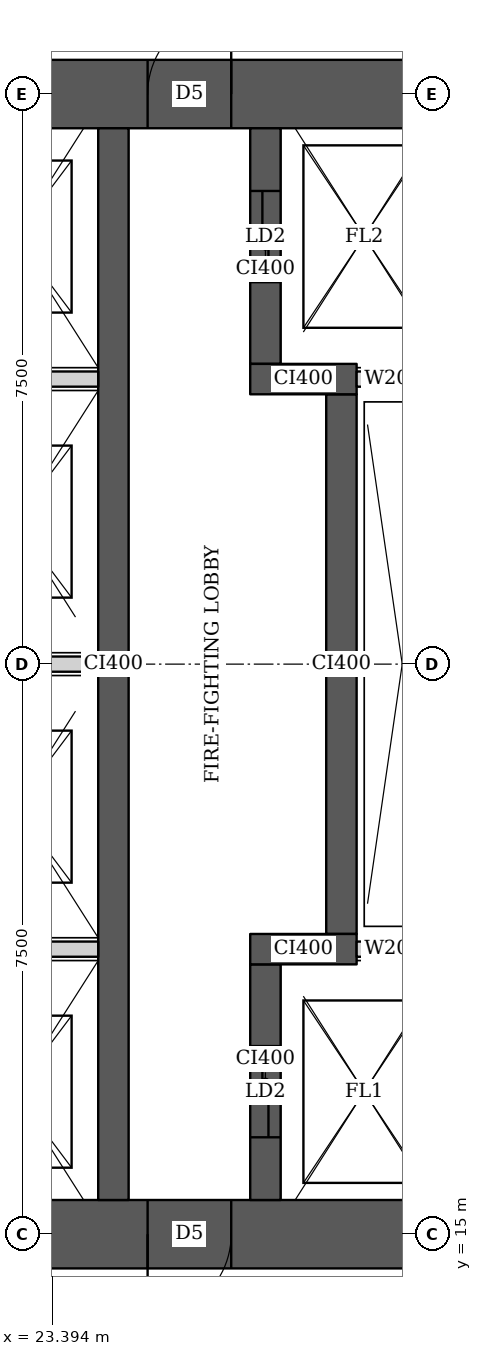
"""IFC4 building model, lengths in metres.
Left out: names, types, materials, properties, quantities, classifications, styles, units other than length and angle.
Written with IfcOpenShell. Run it as: python <this file> out.ifc"""

import sys

from ifc_helpers import new_model, si_unit, direction, frame, frame_2d, origin, place, context, subcontext, project, spatial, rectangle, extrude, element, fill, save


model = new_model("IFC4")
c1 = context("Model", 3, precision=1e-05, world=origin(), true_north=direction((0.0, 1.0)))
c2 = subcontext(c1, "Body", "Model", "MODEL_VIEW")
j1 = project(units=[si_unit("LENGTHUNIT", "METRE"), si_unit("PLANEANGLEUNIT", "RADIAN")], contexts=[c1])
p1 = place(None, origin())
s1 = spatial("IfcSite", under=j1, at=p1, CompositionType="ELEMENT")
p2 = place(p1, origin())
s2 = spatial("IfcBuilding", under=s1, at=p2, CompositionType="ELEMENT")
p3 = place(p2, frame((0.0, 0.0, 266.6)))
s3 = spatial("IfcBuildingStorey", under=s2, at=p3, CompositionType="ELEMENT", Elevation=266.6)
p4 = place(p3, frame((13.95, 15.0, 0.0), z_axis=(0.0, 0.0, 1.0), x_axis=(1.0, 0.0, 0.0)))
e1 = element("IfcWall", 1, at=p4, inside=s3, PredefinedType="SHEAR", context=c2, shape_type="SweptSolid", body=[
    extrude(rectangle(XDim=15.3, YDim=0.9, at=frame_2d((7.65, 0.0))), origin(), (0.0, 0.0, 1.0), 3.75),
])
p5 = place(p4, frame((4.45, 0.0, 0.0)))
e2 = element("IfcOpeningElement", 2, at=p5, cuts=e1, PredefinedType="OPENING", context=c2, shape_type="SweptSolid", body=[
    extrude(rectangle(XDim=1.8, YDim=2.1, at=frame_2d((0.9, 1.05))), frame((0.0, 0.46, 0.0), z_axis=(0.0, -1.0, 0.0), x_axis=(1.0, 0.0, 0.0)), (0.0, 0.0, 1.0), 0.92),
])
p6 = place(p4, frame((10.7, 0.0, 0.0)))
e3 = element("IfcOpeningElement", 3, at=p6, cuts=e1, PredefinedType="OPENING", context=c2, shape_type="SweptSolid", body=[
    extrude(rectangle(XDim=1.1, YDim=2.1, at=frame_2d((0.55, 1.05))), frame((0.0, 0.46, 0.0), z_axis=(0.0, -1.0, 0.0), x_axis=(1.0, 0.0, 0.0)), (0.0, 0.0, 1.0), 0.92),
])
p7 = place(p3, frame((13.95, 30.0, 0.0), z_axis=(0.0, 0.0, 1.0), x_axis=(1.0, 0.0, 0.0)))
e4 = element("IfcWall", 4, at=p7, inside=s3, PredefinedType="SHEAR", context=c2, shape_type="SweptSolid", body=[
    extrude(rectangle(XDim=15.3, YDim=0.9, at=frame_2d((7.65, 0.0))), origin(), (0.0, 0.0, 1.0), 3.75),
])
p8 = place(p7, frame((4.45, 0.0, 0.0)))
e5 = element("IfcOpeningElement", 5, at=p8, cuts=e4, PredefinedType="OPENING", context=c2, shape_type="SweptSolid", body=[
    extrude(rectangle(XDim=1.8, YDim=2.1, at=frame_2d((0.9, 1.05))), frame((0.0, 0.46, 0.0), z_axis=(0.0, -1.0, 0.0), x_axis=(1.0, 0.0, 0.0)), (0.0, 0.0, 1.0), 0.92),
])
p9 = place(p7, frame((10.7, 0.0, 0.0)))
e6 = element("IfcOpeningElement", 6, at=p9, cuts=e4, PredefinedType="OPENING", context=c2, shape_type="SweptSolid", body=[
    extrude(rectangle(XDim=1.1, YDim=2.1, at=frame_2d((0.55, 1.05))), frame((0.0, 0.46, 0.0), z_axis=(0.0, -1.0, 0.0), x_axis=(1.0, 0.0, 0.0)), (0.0, 0.0, 1.0), 0.92),
])
p10 = place(p3, frame((24.2, 15.45, 0.0), z_axis=(0.0, 0.0, 1.0), x_axis=(0.0, 1.0, 0.0)))
e7 = element("IfcWall", 7, at=p10, inside=s3, PredefinedType="SHEAR", context=c2, shape_type="SweptSolid", body=[
    extrude(rectangle(XDim=14.1, YDim=0.4, at=frame_2d((7.05, 0.0))), origin(), (0.0, 0.0, 1.0), 3.75),
])
p11 = place(p3, frame((26.2, 15.45, 0.0), z_axis=(0.0, 0.0, 1.0), x_axis=(0.0, 1.0, 0.0)))
e8 = element("IfcWall", 8, at=p11, inside=s3, PredefinedType="SHEAR", context=c2, shape_type="SweptSolid", body=[
    extrude(rectangle(XDim=3.1, YDim=0.4, at=frame_2d((1.55, 0.0))), origin(), (0.0, 0.0, 1.0), 3.75),
])
p12 = place(p11, frame((0.825, 0.0, 0.0)))
e9 = element("IfcOpeningElement", 9, at=p12, cuts=e8, PredefinedType="OPENING", context=c2, shape_type="SweptSolid", body=[
    extrude(rectangle(XDim=1.2, YDim=2.1, at=frame_2d((0.6, 1.05))), frame((0.0, 0.21, 0.0), z_axis=(0.0, -1.0, 0.0), x_axis=(1.0, 0.0, 0.0)), (0.0, 0.0, 1.0), 0.42),
])
p13 = place(p3, frame((26.0, 18.75, 0.0), z_axis=(0.0, 0.0, 1.0), x_axis=(1.0, 0.0, 0.0)))
e10 = element("IfcWall", 10, at=p13, inside=s3, PredefinedType="SHEAR", context=c2, shape_type="SweptSolid", body=[
    extrude(rectangle(XDim=1.4, YDim=0.4, at=frame_2d((0.7, 0.0))), origin(), (0.0, 0.0, 1.0), 3.75),
])
p14 = place(p3, frame((27.2, 18.95, 0.0), z_axis=(0.0, 0.0, 1.0), x_axis=(0.0, 1.0, 0.0)))
e11 = element("IfcWall", 11, at=p14, inside=s3, PredefinedType="SHEAR", context=c2, shape_type="SweptSolid", body=[
    extrude(rectangle(XDim=7.1, YDim=0.4, at=frame_2d((3.55, 0.0))), origin(), (0.0, 0.0, 1.0), 3.75),
])
p15 = place(p3, frame((26.0, 26.25, 0.0), z_axis=(0.0, 0.0, 1.0), x_axis=(1.0, 0.0, 0.0)))
e12 = element("IfcWall", 12, at=p15, inside=s3, PredefinedType="SHEAR", context=c2, shape_type="SweptSolid", body=[
    extrude(rectangle(XDim=1.4, YDim=0.4, at=frame_2d((0.7, 0.0))), origin(), (0.0, 0.0, 1.0), 3.75),
])
p16 = place(p3, frame((26.2, 26.45, 0.0), z_axis=(0.0, 0.0, 1.0), x_axis=(0.0, 1.0, 0.0)))
e13 = element("IfcWall", 13, at=p16, inside=s3, PredefinedType="SHEAR", context=c2, shape_type="SweptSolid", body=[
    extrude(rectangle(XDim=3.1, YDim=0.4, at=frame_2d((1.55, 0.0))), origin(), (0.0, 0.0, 1.0), 3.75),
])
p17 = place(p16, frame((1.075, 0.0, 0.0)))
e14 = element("IfcOpeningElement", 14, at=p17, cuts=e13, PredefinedType="OPENING", context=c2, shape_type="SweptSolid", body=[
    extrude(rectangle(XDim=1.2, YDim=2.1, at=frame_2d((0.6, 1.05))), frame((0.0, 0.21, 0.0), z_axis=(0.0, -1.0, 0.0), x_axis=(1.0, 0.0, 0.0)), (0.0, 0.0, 1.0), 0.42),
])
for number, where, z_axis, x_axis in (
    (15, (21.8, 18.75, 0.0), (0.0, 0.0, 1.0), (1.0, 0.0, 0.0)),
    (16, (21.8, 22.5, 0.0), (0.0, 0.0, 1.0), (1.0, 0.0, 0.0)),
    (17, (21.8, 26.25, 0.0), (0.0, 0.0, 1.0), (1.0, 0.0, 0.0)),
):
    element("IfcWall", number, at=place(p3, frame(where, z_axis=z_axis, x_axis=x_axis)), inside=s3, PredefinedType="SOLIDWALL", context=c2, shape_type="SweptSolid", body=[
        extrude(rectangle(XDim=2.2, YDim=0.2, at=frame_2d((1.1, 0.0))), origin(), (0.0, 0.0, 1.0), 3.5),
    ])
for number, where, z_axis, x_axis in (
    (18, (27.4, 18.75, 0.0), (0.0, 0.0, 1.0), (1.0, 0.0, 0.0)),
    (19, (27.4, 26.25, 0.0), (0.0, 0.0, 1.0), (1.0, 0.0, 0.0)),
):
    element("IfcWall", number, at=place(p3, frame(where, z_axis=z_axis, x_axis=x_axis)), inside=s3, PredefinedType="SOLIDWALL", context=c2, shape_type="SweptSolid", body=[
        extrude(rectangle(XDim=0.95, YDim=0.2, at=frame_2d((0.475, 0.0))), origin(), (0.0, 0.0, 1.0), 3.5),
    ])
p18 = place(p6, origin())
e20 = element("IfcDoor", 20, at=p18, inside=s3, OperationType="SINGLE_SWING_RIGHT", PredefinedType="DOOR", context=c2, shape_type="SweptSolid", body=[
    extrude(rectangle(XDim=1.1, YDim=2.1, at=frame_2d((0.55, 1.05))), frame((0.0, 0.025, 0.0), z_axis=(0.0, -1.0, 0.0), x_axis=(1.0, 0.0, 0.0)), (0.0, 0.0, 1.0), 0.05),
])
fill(e3, e20)
p19 = place(p9, origin())
e21 = element("IfcDoor", 21, at=p19, inside=s3, OperationType="SINGLE_SWING_RIGHT", PredefinedType="DOOR", context=c2, shape_type="SweptSolid", body=[
    extrude(rectangle(XDim=1.1, YDim=2.1, at=frame_2d((0.55, 1.05))), frame((0.0, 0.025, 0.0), z_axis=(0.0, -1.0, 0.0), x_axis=(1.0, 0.0, 0.0)), (0.0, 0.0, 1.0), 0.05),
])
fill(e6, e21)
p20 = place(p12, origin())
e22 = element("IfcDoor", 22, at=p20, inside=s3, OperationType="DOUBLE_DOOR_SLIDING", PredefinedType="DOOR", context=c2, shape_type="SweptSolid", body=[
    extrude(rectangle(XDim=1.2, YDim=2.1, at=frame_2d((0.6, 1.05))), frame((0.0, 0.025, 0.0), z_axis=(0.0, -1.0, 0.0), x_axis=(1.0, 0.0, 0.0)), (0.0, 0.0, 1.0), 0.05),
])
fill(e9, e22)
p21 = place(p17, origin())
e23 = element("IfcDoor", 23, at=p21, inside=s3, OperationType="DOUBLE_DOOR_SLIDING", PredefinedType="DOOR", context=c2, shape_type="SweptSolid", body=[
    extrude(rectangle(XDim=1.2, YDim=2.1, at=frame_2d((0.6, 1.05))), frame((0.0, 0.025, 0.0), z_axis=(0.0, -1.0, 0.0), x_axis=(1.0, 0.0, 0.0)), (0.0, 0.0, 1.0), 0.05),
])
fill(e14, e23)
save(model, sys.argv[1])
